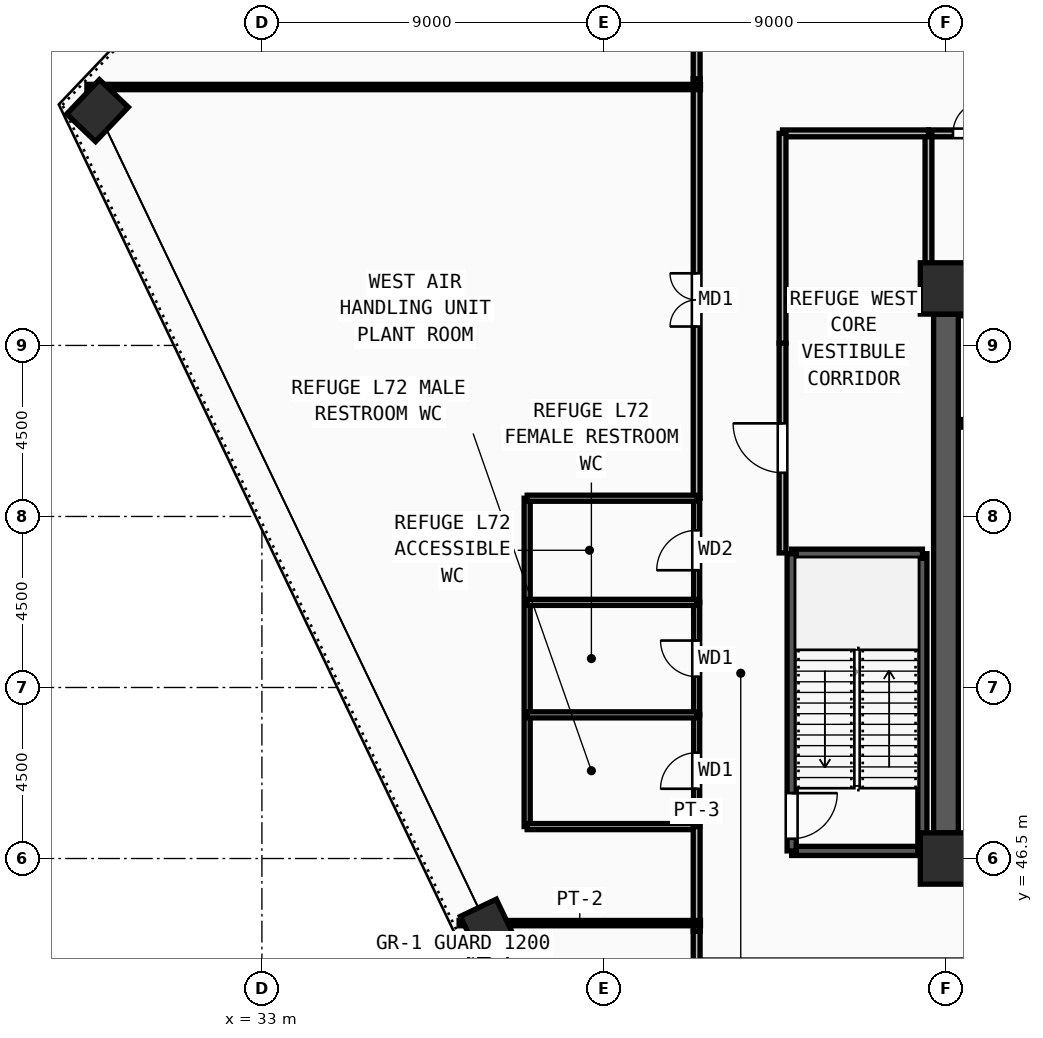
"""IFC4 building model, lengths in metres.
Left out: names, types, materials, properties, quantities, classifications, styles, units other than length and angle.
Written with IfcOpenShell. Run it as: python <this file> out.ifc"""

import sys

from ifc_helpers import new_model, si_unit, direction, frame, frame_2d, origin, origin_2d, place, context, subcontext, project, spatial, rectangle, extrude, source, transform, mapped, element, fill, save


model = new_model("IFC4")
c1 = context("Model", 3, precision=1e-05, world=origin(), true_north=direction((0.0, 1.0)))
c2 = subcontext(c1, "Body", "Model", "MODEL_VIEW")
j1 = project(units=[si_unit("LENGTHUNIT", "METRE"), si_unit("PLANEANGLEUNIT", "RADIAN")], contexts=[c1])
p1 = place(None, origin())
s1 = spatial("IfcSite", under=j1, at=p1, CompositionType="ELEMENT")
p2 = place(p1, origin())
s2 = spatial("IfcBuilding", under=s1, at=p2, CompositionType="ELEMENT")
p3 = place(p2, frame((0.0, 0.0, 277.5)))
s3 = spatial("IfcBuildingStorey", under=s2, at=p3, CompositionType="ELEMENT", Elevation=277.5)
m1 = source(origin(), c2, "Body", "SweptSolid", [
    extrude(rectangle(XDim=1.35, YDim=1.35, at=origin_2d()), origin(), (0.0, 0.0, 1.0), 4.5),
])
for number, where, z_axis, x_axis in (
    (1, (51.0, 46.5, 0.0), (0.0, 0.0, 1.0), (1.0, 0.0, 0.0)),
    (2, (51.0, 61.5, 0.0), (0.0, 0.0, 1.0), (1.0, 0.0, 0.0)),
):
    element("IfcColumn", number, at=place(p3, frame(where, z_axis=z_axis, x_axis=x_axis)), inside=s3, PredefinedType="COLUMN", context=c2, shape_type="MappedRepresentation", body=[
        mapped(m1, transform((0.0, 0.0, 0.0), x_axis=(1.0, 0.0, 0.0), y_axis=(0.0, 1.0, 0.0), z_axis=(0.0, 0.0, 1.0), scale=1.0)),
    ])
m2 = source(origin(), c2, "Body", "SweptSolid", [
    extrude(rectangle(XDim=1.25, YDim=1.05, at=origin_2d()), origin(), (0.0, 0.0, 1.0), 4.5),
])
for number, where, z_axis, x_axis in (
    (3, (38.964, 44.639, 0.0), (0.0, 0.0, 1.0), (-0.431, 0.902, 0.0)),
    (4, (28.674, 66.179, 0.0), (0.0, 0.0, 1.0), (0.689, 0.724, 0.0)),
):
    element("IfcColumn", number, at=place(p3, frame(where, z_axis=z_axis, x_axis=x_axis)), inside=s3, PredefinedType="COLUMN", context=c2, shape_type="MappedRepresentation", body=[
        mapped(m2, transform((0.0, 0.0, 0.0), x_axis=(1.0, 0.0, 0.0), y_axis=(0.0, 1.0, 0.0), z_axis=(0.0, 0.0, 1.0), scale=1.0)),
    ])
p4 = place(p3, frame((51.0, 47.175, 0.0), z_axis=(0.0, 0.0, 1.0), x_axis=(0.0, 1.0, 0.0)))
e5 = element("IfcWall", 5, at=p4, inside=s3, PredefinedType="SHEAR", context=c2, shape_type="SweptSolid", body=[
    extrude(rectangle(XDim=13.65, YDim=0.65, at=frame_2d((6.825, 0.0))), origin(), (0.0, 0.0, 1.0), 4.22),
])
p5 = place(p3, frame((46.94, 46.7, 0.0), z_axis=(0.0, 0.0, 1.0), x_axis=(1.0, 0.0, 0.0)))
e6 = element("IfcWall", 6, at=p5, inside=s3, PredefinedType="SOLIDWALL", context=c2, shape_type="SweptSolid", body=[
    extrude(rectangle(XDim=3.44, YDim=0.24, at=frame_2d((1.72, 0.0))), origin(), (0.0, 0.0, 1.0), 4.22),
])
p6 = place(p3, frame((50.38, 46.7, 0.0), z_axis=(0.0, 0.0, 1.0), x_axis=(0.0, 1.0, 0.0)))
e7 = element("IfcWall", 7, at=p6, inside=s3, PredefinedType="SOLIDWALL", context=c2, shape_type="SweptSolid", body=[
    extrude(rectangle(XDim=7.82, YDim=0.24, at=frame_2d((3.91, 0.0))), origin(), (0.0, 0.0, 1.0), 4.22),
])
p7 = place(p3, frame((50.38, 54.52, 0.0), z_axis=(0.0, 0.0, 1.0), x_axis=(-1.0, 0.0, 0.0)))
e8 = element("IfcWall", 8, at=p7, inside=s3, PredefinedType="SOLIDWALL", context=c2, shape_type="SweptSolid", body=[
    extrude(rectangle(XDim=3.44, YDim=0.24, at=frame_2d((1.72, 0.0))), origin(), (0.0, 0.0, 1.0), 4.22),
])
p8 = place(p3, frame((46.94, 54.52, 0.0), z_axis=(0.0, 0.0, 1.0), x_axis=(0.0, -1.0, 0.0)))
e9 = element("IfcWall", 9, at=p8, inside=s3, PredefinedType="SOLIDWALL", context=c2, shape_type="SweptSolid", body=[
    extrude(rectangle(XDim=7.82, YDim=0.24, at=frame_2d((3.91, 0.0))), origin(), (0.0, 0.0, 1.0), 4.22),
])
m3 = source(origin(), c2, "Body", "SweptSolid", [
    extrude(rectangle(XDim=1.2, YDim=2.2, at=frame_2d((0.6, 1.1))), frame((0.0, 0.13, 0.0), z_axis=(0.0, -1.0, 0.0), x_axis=(1.0, 0.0, 0.0)), (0.0, 0.0, 1.0), 0.26),
])
p9 = place(p8, frame((6.3, 0.0, 0.0)))
e10 = element("IfcOpeningElement", 10, at=p9, cuts=e9, PredefinedType="OPENING", context=c2, shape_type="MappedRepresentation", body=[
    mapped(m3, transform((0.0, 0.0, 0.0), x_axis=(1.0, 0.0, 0.0), y_axis=(0.0, 1.0, 0.0), z_axis=(0.0, 0.0, 1.0), scale=1.0)),
])
for number, where, z_axis, x_axis in (
    (11, (51.4, 57.95, 0.0), (0.0, 0.0, 1.0), (1.0, 0.0, 0.0)),
    (12, (53.8, 60.88, 0.0), (0.0, 0.0, 1.0), (-1.0, 0.0, 0.0)),
):
    element("IfcWall", number, at=place(p3, frame(where, z_axis=z_axis, x_axis=x_axis)), inside=s3, PredefinedType="SOLIDWALL", context=c2, shape_type="SweptSolid", body=[
        extrude(rectangle(XDim=2.4, YDim=0.2, at=frame_2d((1.2, 0.0))), origin(), (0.0, 0.0, 1.0), 4.22),
    ])
p10 = place(p3, frame((44.44, 47.34, 0.0), z_axis=(0.0, 0.0, 1.0), x_axis=(0.0, 1.0, 0.0)))
e13 = element("IfcWall", 13, at=p10, inside=s3, PredefinedType="PARTITIONING", context=c2, shape_type="SweptSolid", body=[
    extrude(rectangle(XDim=2.94, YDim=0.16, at=frame_2d((1.47, 0.0))), origin(), (0.0, 0.0, 1.0), 4.22),
])
m4 = source(origin(), c2, "Body", "SweptSolid", [
    extrude(rectangle(XDim=0.95, YDim=2.15, at=frame_2d((0.475, 1.075))), frame((0.0, 0.09, 0.0), z_axis=(0.0, -1.0, 0.0), x_axis=(1.0, 0.0, 0.0)), (0.0, 0.0, 1.0), 0.18),
])
p11 = place(p10, frame((0.995, 0.0, 0.0)))
e14 = element("IfcOpeningElement", 14, at=p11, cuts=e13, PredefinedType="OPENING", context=c2, shape_type="MappedRepresentation", body=[
    mapped(m4, transform((0.0, 0.0, 0.0), x_axis=(1.0, 0.0, 0.0), y_axis=(0.0, 1.0, 0.0), z_axis=(0.0, 0.0, 1.0), scale=1.0)),
])
p12 = place(p3, frame((44.44, 50.28, 0.0), z_axis=(0.0, 0.0, 1.0), x_axis=(0.0, 1.0, 0.0)))
e15 = element("IfcWall", 15, at=p12, inside=s3, PredefinedType="PARTITIONING", context=c2, shape_type="SweptSolid", body=[
    extrude(rectangle(XDim=2.96, YDim=0.16, at=frame_2d((1.48, 0.0))), origin(), (0.0, 0.0, 1.0), 3.855),
])
p13 = place(p12, frame((1.005, 0.0, 0.0)))
e16 = element("IfcOpeningElement", 16, at=p13, cuts=e15, PredefinedType="OPENING", context=c2, shape_type="MappedRepresentation", body=[
    mapped(m4, transform((0.0, 0.0, 0.0), x_axis=(1.0, 0.0, 0.0), y_axis=(0.0, 1.0, 0.0), z_axis=(0.0, 0.0, 1.0), scale=1.0)),
])
p14 = place(p3, frame((44.44, 53.24, 0.0), z_axis=(0.0, 0.0, 1.0), x_axis=(0.0, 1.0, 0.0)))
e17 = element("IfcWall", 17, at=p14, inside=s3, PredefinedType="PARTITIONING", context=c2, shape_type="SweptSolid", body=[
    extrude(rectangle(XDim=2.74, YDim=0.16, at=frame_2d((1.37, 0.0))), origin(), (0.0, 0.0, 1.0), 4.22),
])
m5 = source(origin(), c2, "Body", "SweptSolid", [
    extrude(rectangle(XDim=1.05, YDim=2.15, at=frame_2d((0.525, 1.075))), frame((0.0, 0.09, 0.0), z_axis=(0.0, -1.0, 0.0), x_axis=(1.0, 0.0, 0.0)), (0.0, 0.0, 1.0), 0.18),
])
p15 = place(p14, frame((0.845, 0.0, 0.0)))
e18 = element("IfcOpeningElement", 18, at=p15, cuts=e17, PredefinedType="OPENING", context=c2, shape_type="MappedRepresentation", body=[
    mapped(m5, transform((0.0, 0.0, 0.0), x_axis=(1.0, 0.0, 0.0), y_axis=(0.0, 1.0, 0.0), z_axis=(0.0, 0.0, 1.0), scale=1.0)),
])
p16 = place(p3, frame((50.54, 65.58, 0.0), z_axis=(0.0, 0.0, 1.0), x_axis=(1.0, 0.0, 0.0)))
e19 = element("IfcWall", 19, at=p16, inside=s3, PredefinedType="PARTITIONING", context=c2, shape_type="SweptSolid", body=[
    extrude(rectangle(XDim=2.14, YDim=0.18, at=frame_2d((1.07, 0.0))), origin(), (0.0, 0.0, 1.0), 4.22),
])
m6 = source(origin(), c2, "Body", "SweptSolid", [
    extrude(rectangle(XDim=0.85, YDim=2.1, at=frame_2d((0.425, 1.05))), frame((0.0, 0.1, 0.0), z_axis=(0.0, -1.0, 0.0), x_axis=(1.0, 0.0, 0.0)), (0.0, 0.0, 1.0), 0.2),
])
p17 = place(p16, frame((0.645, 0.0, 0.0)))
e20 = element("IfcOpeningElement", 20, at=p17, cuts=e19, PredefinedType="OPENING", context=c2, shape_type="MappedRepresentation", body=[
    mapped(m6, transform((0.0, 0.0, 0.0), x_axis=(1.0, 0.0, 0.0), y_axis=(0.0, 1.0, 0.0), z_axis=(0.0, 0.0, 1.0), scale=1.0)),
])
p18 = place(p3, frame((46.7, 54.54, 0.0), z_axis=(0.0, 0.0, 1.0), x_axis=(0.0, 1.0, 0.0)))
e21 = element("IfcWall", 21, at=p18, inside=s3, PredefinedType="PARTITIONING", context=c2, shape_type="SweptSolid", body=[
    extrude(rectangle(XDim=5.52, YDim=0.18, at=frame_2d((2.76, 0.0))), origin(), (0.0, 0.0, 1.0), 4.22),
])
m7 = source(origin(), c2, "Body", "SweptSolid", [
    extrude(rectangle(XDim=1.3, YDim=2.2, at=frame_2d((0.65, 1.1))), frame((0.0, 0.1, 0.0), z_axis=(0.0, -1.0, 0.0), x_axis=(1.0, 0.0, 0.0)), (0.0, 0.0, 1.0), 0.2),
])
p19 = place(p18, frame((2.11, 0.0, 0.0)))
e22 = element("IfcOpeningElement", 22, at=p19, cuts=e21, PredefinedType="OPENING", context=c2, shape_type="MappedRepresentation", body=[
    mapped(m7, transform((0.0, 0.0, 0.0), x_axis=(1.0, 0.0, 0.0), y_axis=(0.0, 1.0, 0.0), z_axis=(0.0, 0.0, 1.0), scale=1.0)),
])
p20 = place(p3, frame((44.44, 55.98, 0.0), z_axis=(0.0, 0.0, 1.0), x_axis=(0.0, 1.0, 0.0)))
e23 = element("IfcWall", 23, at=p20, inside=s3, PredefinedType="PARTITIONING", context=c2, shape_type="SweptSolid", body=[
    extrude(rectangle(XDim=11.035, YDim=0.18, at=frame_2d((5.518, 0.0))), origin(), (0.0, 0.0, 1.0), 4.22),
])
m8 = source(origin(), c2, "Body", "SweptSolid", [
    extrude(rectangle(XDim=1.4, YDim=2.25, at=frame_2d((0.7, 1.125))), frame((0.0, 0.1, 0.0), z_axis=(0.0, -1.0, 0.0), x_axis=(1.0, 0.0, 0.0)), (0.0, 0.0, 1.0), 0.2),
])
p21 = place(p20, frame((4.518, 0.0, 0.0)))
e24 = element("IfcOpeningElement", 24, at=p21, cuts=e23, PredefinedType="OPENING", context=c2, shape_type="MappedRepresentation", body=[
    mapped(m8, transform((0.0, 0.0, 0.0), x_axis=(1.0, 0.0, 0.0), y_axis=(0.0, 1.0, 0.0), z_axis=(0.0, 0.0, 1.0), scale=1.0)),
])
p22 = place(p3, frame((39.98, 47.34, 0.0), z_axis=(0.0, 0.0, 1.0), x_axis=(0.0, 1.0, 0.0)))
e25 = element("IfcWall", 25, at=p22, inside=s3, PredefinedType="PARTITIONING", context=c2, shape_type="SweptSolid", body=[
    extrude(rectangle(XDim=8.64, YDim=0.16, at=frame_2d((4.32, 0.0))), origin(), (0.0, 0.0, 1.0), 4.22),
])
for number, where, z_axis, x_axis in (
    (26, (39.98, 47.34, 0.0), (0.0, 0.0, 1.0), (1.0, 0.0, 0.0)),
    (27, (39.98, 50.28, 0.0), (0.0, 0.0, 1.0), (1.0, 0.0, 0.0)),
    (28, (39.98, 53.24, 0.0), (0.0, 0.0, 1.0), (1.0, 0.0, 0.0)),
    (29, (39.98, 55.98, 0.0), (0.0, 0.0, 1.0), (1.0, 0.0, 0.0)),
):
    element("IfcWall", number, at=place(p3, frame(where, z_axis=z_axis, x_axis=x_axis)), inside=s3, PredefinedType="PARTITIONING", context=c2, shape_type="SweptSolid", body=[
        extrude(rectangle(XDim=4.46, YDim=0.16, at=frame_2d((2.23, 0.0))), origin(), (0.0, 0.0, 1.0), 4.22),
    ])
p23 = place(p3, frame((50.54, 61.95, 0.0), z_axis=(0.0, 0.0, 1.0), x_axis=(0.0, 1.0, 0.0)))
e30 = element("IfcWall", 30, at=p23, inside=s3, PredefinedType="PARTITIONING", context=c2, shape_type="SweptSolid", body=[
    extrude(rectangle(XDim=3.63, YDim=0.18, at=frame_2d((1.815, 0.0))), origin(), (0.0, 0.0, 1.0), 4.22),
])
p24 = place(p3, frame((46.7, 65.58, 0.0), z_axis=(0.0, 0.0, 1.0), x_axis=(1.0, 0.0, 0.0)))
e31 = element("IfcWall", 31, at=p24, inside=s3, PredefinedType="PARTITIONING", context=c2, shape_type="SweptSolid", body=[
    extrude(rectangle(XDim=3.84, YDim=0.18, at=frame_2d((1.92, 0.0))), origin(), (0.0, 0.0, 1.0), 4.22),
])
p25 = place(p3, frame((46.7, 60.06, 0.0), z_axis=(0.0, 0.0, 1.0), x_axis=(0.0, 1.0, 0.0)))
e32 = element("IfcWall", 32, at=p25, inside=s3, PredefinedType="PARTITIONING", context=c2, shape_type="SweptSolid", body=[
    extrude(rectangle(XDim=5.52, YDim=0.18, at=frame_2d((2.76, 0.0))), origin(), (0.0, 0.0, 1.0), 4.22),
])
p26 = place(p3, frame((44.44, 67.015, 0.0), z_axis=(0.0, 0.0, 1.0), x_axis=(0.0, 1.0, 0.0)))
e33 = element("IfcWall", 33, at=p26, inside=s3, PredefinedType="PARTITIONING", context=c2, shape_type="SweptSolid", body=[
    extrude(rectangle(XDim=0.965, YDim=0.18, at=frame_2d((0.482, 0.0))), origin(), (0.0, 0.0, 1.0), 4.22),
])
p27 = place(p3, frame((44.44, 44.585, 0.0), z_axis=(0.0, 0.0, 1.0), x_axis=(0.0, 1.0, 0.0)))
e34 = element("IfcWall", 34, at=p27, inside=s3, PredefinedType="PARTITIONING", context=c2, shape_type="SweptSolid", body=[
    extrude(rectangle(XDim=2.755, YDim=0.18, at=frame_2d((1.377, 0.0))), origin(), (0.0, 0.0, 1.0), 4.22),
])
p28 = place(p3, frame((44.44, 43.67, 0.0), z_axis=(0.0, 0.0, 1.0), x_axis=(0.0, 1.0, 0.0)))
e35 = element("IfcWall", 35, at=p28, inside=s3, PredefinedType="PARTITIONING", context=c2, shape_type="SweptSolid", body=[
    extrude(rectangle(XDim=0.915, YDim=0.18, at=frame_2d((0.458, 0.0))), origin(), (0.0, 0.0, 1.0), 4.22),
])
p29 = place(p3, frame((44.54, 44.8, 0.0), z_axis=(0.0, 0.0, 1.0), x_axis=(-1.0, 0.0, 0.0)))
e36 = element("IfcWall", 36, at=p29, inside=s3, PredefinedType="PARTITIONING", context=c2, shape_type="SweptSolid", body=[
    extrude(rectangle(XDim=6.351, YDim=0.14, at=frame_2d((3.176, 0.0))), origin(), (0.0, 0.0, 1.0), 4.22),
])
p30 = place(p3, frame((44.54, 66.8, 0.0), z_axis=(0.0, 0.0, 1.0), x_axis=(-1.0, 0.0, 0.0)))
e37 = element("IfcWall", 37, at=p30, inside=s3, PredefinedType="PARTITIONING", context=c2, shape_type="SweptSolid", body=[
    extrude(rectangle(XDim=16.145, YDim=0.14, at=frame_2d((8.073, 0.0))), origin(), (0.0, 0.0, 1.0), 4.22),
])
m9 = source(origin(), c2, "Body", "SweptSolid", [
    extrude(rectangle(XDim=1.2, YDim=2.2, at=frame_2d((0.6, 1.1))), frame((0.0, 0.025, 0.0), z_axis=(0.0, -1.0, 0.0), x_axis=(1.0, 0.0, 0.0)), (0.0, 0.0, 1.0), 0.05),
])
p31 = place(p9, origin())
e38 = element("IfcDoor", 38, at=p31, inside=s3, OperationType="SINGLE_SWING_LEFT", PredefinedType="DOOR", context=c2, shape_type="MappedRepresentation", body=[
    mapped(m9, transform((0.0, 0.0, 0.0), x_axis=(1.0, 0.0, 0.0), y_axis=(0.0, 1.0, 0.0), z_axis=(0.0, 0.0, 1.0), scale=1.0)),
])
fill(e10, e38)
m10 = source(origin(), c2, "Body", "SweptSolid", [
    extrude(rectangle(XDim=0.95, YDim=2.15, at=frame_2d((0.475, 1.075))), frame((0.0, 0.025, 0.0), z_axis=(0.0, -1.0, 0.0), x_axis=(1.0, 0.0, 0.0)), (0.0, 0.0, 1.0), 0.05),
])
p32 = place(p11, origin())
e39 = element("IfcDoor", 39, at=p32, inside=s3, OperationType="SINGLE_SWING_LEFT", PredefinedType="DOOR", context=c2, shape_type="MappedRepresentation", body=[
    mapped(m10, transform((0.0, 0.0, 0.0), x_axis=(1.0, 0.0, 0.0), y_axis=(0.0, 1.0, 0.0), z_axis=(0.0, 0.0, 1.0), scale=1.0)),
])
fill(e14, e39)
p33 = place(p13, origin())
e40 = element("IfcDoor", 40, at=p33, inside=s3, OperationType="SINGLE_SWING_RIGHT", PredefinedType="DOOR", context=c2, shape_type="MappedRepresentation", body=[
    mapped(m10, transform((0.0, 0.0, 0.0), x_axis=(1.0, 0.0, 0.0), y_axis=(0.0, 1.0, 0.0), z_axis=(0.0, 0.0, 1.0), scale=1.0)),
])
fill(e16, e40)
m11 = source(origin(), c2, "Body", "SweptSolid", [
    extrude(rectangle(XDim=1.05, YDim=2.15, at=frame_2d((0.525, 1.075))), frame((0.0, 0.025, 0.0), z_axis=(0.0, -1.0, 0.0), x_axis=(1.0, 0.0, 0.0)), (0.0, 0.0, 1.0), 0.05),
])
p34 = place(p15, origin())
e41 = element("IfcDoor", 41, at=p34, inside=s3, OperationType="SINGLE_SWING_LEFT", PredefinedType="DOOR", context=c2, shape_type="MappedRepresentation", body=[
    mapped(m11, transform((0.0, 0.0, 0.0), x_axis=(1.0, 0.0, 0.0), y_axis=(0.0, 1.0, 0.0), z_axis=(0.0, 0.0, 1.0), scale=1.0)),
])
fill(e18, e41)
m12 = source(origin(), c2, "Body", "SweptSolid", [
    extrude(rectangle(XDim=0.85, YDim=2.1, at=frame_2d((0.425, 1.05))), frame((0.0, 0.025, 0.0), z_axis=(0.0, -1.0, 0.0), x_axis=(1.0, 0.0, 0.0)), (0.0, 0.0, 1.0), 0.05),
])
p35 = place(p17, origin())
e42 = element("IfcDoor", 42, at=p35, inside=s3, OperationType="SINGLE_SWING_RIGHT", PredefinedType="DOOR", context=c2, shape_type="MappedRepresentation", body=[
    mapped(m12, transform((0.0, 0.0, 0.0), x_axis=(1.0, 0.0, 0.0), y_axis=(0.0, 1.0, 0.0), z_axis=(0.0, 0.0, 1.0), scale=1.0)),
])
fill(e20, e42)
m13 = source(origin(), c2, "Body", "SweptSolid", [
    extrude(rectangle(XDim=1.3, YDim=2.2, at=frame_2d((0.65, 1.1))), frame((0.0, 0.025, 0.0), z_axis=(0.0, -1.0, 0.0), x_axis=(1.0, 0.0, 0.0)), (0.0, 0.0, 1.0), 0.05),
])
p36 = place(p19, origin())
e43 = element("IfcDoor", 43, at=p36, inside=s3, OperationType="SINGLE_SWING_RIGHT", PredefinedType="DOOR", context=c2, shape_type="MappedRepresentation", body=[
    mapped(m13, transform((0.0, 0.0, 0.0), x_axis=(1.0, 0.0, 0.0), y_axis=(0.0, 1.0, 0.0), z_axis=(0.0, 0.0, 1.0), scale=1.0)),
])
fill(e22, e43)
m14 = source(origin(), c2, "Body", "SweptSolid", [
    extrude(rectangle(XDim=1.4, YDim=2.25, at=frame_2d((0.7, 1.125))), frame((0.0, 0.025, 0.0), z_axis=(0.0, -1.0, 0.0), x_axis=(1.0, 0.0, 0.0)), (0.0, 0.0, 1.0), 0.05),
])
p37 = place(p21, origin())
e44 = element("IfcDoor", 44, at=p37, inside=s3, OperationType="DOUBLE_DOOR_SINGLE_SWING", PredefinedType="DOOR", context=c2, shape_type="MappedRepresentation", body=[
    mapped(m14, transform((0.0, 0.0, 0.0), x_axis=(1.0, 0.0, 0.0), y_axis=(0.0, 1.0, 0.0), z_axis=(0.0, 0.0, 1.0), scale=1.0)),
])
fill(e24, e44)
save(model, sys.argv[1])
